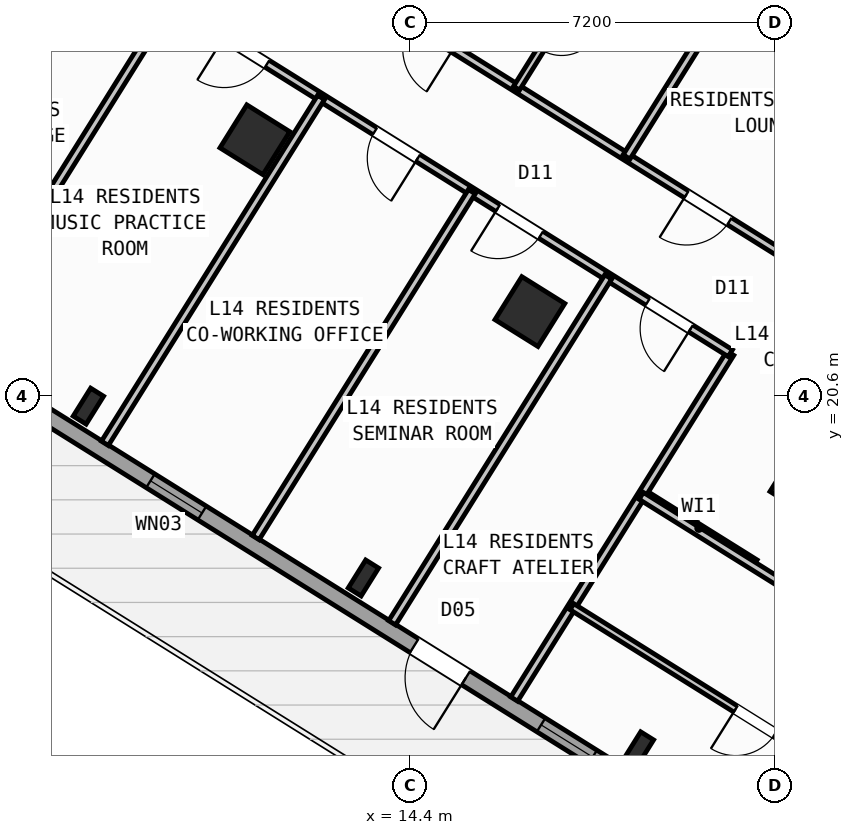
"""IFC4 building model, lengths in metres.
Left out: names, types, materials, properties, quantities, classifications, styles, units other than length and angle.
Written with IfcOpenShell. Run it as: python <this file> out.ifc"""

import sys

from ifc_helpers import new_model, si_unit, direction, frame, frame_2d, origin, origin_2d, place, context, subcontext, project, spatial, rectangle, hollow_rectangle, i_section, extrude, source, transform, mapped, element, fill, save


model = new_model("IFC4")
c1 = context("Model", 3, precision=1e-05, world=origin(), true_north=direction((0.0, 1.0)))
c2 = subcontext(c1, "Body", "Model", "MODEL_VIEW")
j1 = project(units=[si_unit("LENGTHUNIT", "METRE"), si_unit("PLANEANGLEUNIT", "RADIAN")], contexts=[c1])
p1 = place(None, origin())
s1 = spatial("IfcSite", under=j1, at=p1, CompositionType="ELEMENT")
p2 = place(p1, origin())
s2 = spatial("IfcBuilding", under=s1, at=p2, CompositionType="ELEMENT")
p3 = place(p2, frame((0.0, 0.0, 56.4)))
s3 = spatial("IfcBuildingStorey", under=s2, at=p3, CompositionType="ELEMENT", Elevation=56.4)
m1 = source(origin(), c2, "Body", "SweptSolid", [
    extrude(hollow_rectangle(XDim=1.0, YDim=1.0, WallThickness=0.04, at=origin_2d()), origin(), (0.0, 0.0, 1.0), 3.6),
])
p4 = place(p3, frame((22.191, 18.87, 0.0), z_axis=(0.0, 0.0, 1.0), x_axis=(-0.848048096156, 0.529919264233, 0.0)))
e1 = element("IfcColumn", 1, at=p4, inside=s3, PredefinedType="COLUMN", context=c2, shape_type="MappedRepresentation", body=[
    mapped(m1, transform((0.0, 0.0, 0.0), scale=1.0)),
])
m2 = source(origin(), c2, "Body", "SweptSolid", [
    extrude(i_section(OverallWidth=0.3, OverallDepth=0.65, WebThickness=0.016, FlangeThickness=0.031, at=origin_2d()), origin(), (0.0, 0.0, 1.0), 3.6),
])
p5 = place(p3, frame((18.906, 13.612, 0.0), z_axis=(0.0, 0.0, 1.0), x_axis=(-0.848048096156, 0.529919264233, 0.0)))
e2 = element("IfcColumn", 2, at=p5, inside=s3, PredefinedType="COLUMN", context=c2, shape_type="MappedRepresentation", body=[
    mapped(m2, transform((0.0, 0.0, 0.0), scale=1.0)),
])
p6 = place(p3, frame((16.764, 22.261, 0.0), z_axis=(0.0, 0.0, 1.0), x_axis=(-0.848048096156, 0.529919264233, 0.0)))
e3 = element("IfcColumn", 3, at=p6, inside=s3, PredefinedType="COLUMN", context=c2, shape_type="MappedRepresentation", body=[
    mapped(m1, transform((0.0, 0.0, 0.0), scale=1.0)),
])
p7 = place(p3, frame((13.478, 17.003, 0.0), z_axis=(0.0, 0.0, 1.0), x_axis=(-0.848048096156, 0.529919264233, 0.0)))
e4 = element("IfcColumn", 4, at=p7, inside=s3, PredefinedType="COLUMN", context=c2, shape_type="MappedRepresentation", body=[
    mapped(m2, transform((0.0, 0.0, 0.0), scale=1.0)),
])
p8 = place(p3, frame((11.336, 25.653, 0.0), z_axis=(0.0, 0.0, 1.0), x_axis=(-0.848048096156, 0.529919264233, 0.0)))
e5 = element("IfcColumn", 5, at=p8, inside=s3, PredefinedType="COLUMN", context=c2, shape_type="MappedRepresentation", body=[
    mapped(m1, transform((0.0, 0.0, 0.0), scale=1.0)),
])
p9 = place(p3, frame((8.051, 20.395, 0.0), z_axis=(0.0, 0.0, 1.0), x_axis=(-0.848048096156, 0.529919264233, 0.0)))
e6 = element("IfcColumn", 6, at=p9, inside=s3, PredefinedType="COLUMN", context=c2, shape_type="MappedRepresentation", body=[
    mapped(m2, transform((0.0, 0.0, 0.0), scale=1.0)),
])
p10 = place(p3, frame((29.268, 6.429, 0.0), z_axis=(0.0, 0.0, 1.0), x_axis=(-0.848049971435, 0.529916263149, 0.0)))
e7 = element("IfcWall", 7, at=p10, inside=s3, PredefinedType="STANDARD", context=c2, shape_type="SweptSolid", body=[
    extrude(rectangle(XDim=31.588, YDim=0.32, at=frame_2d((15.794, 0.0))), origin(), (0.0, 0.0, 1.0), 3.35),
])
p11 = place(p10, frame((16.235, 0.0, 0.0)))
e8 = element("IfcOpeningElement", 8, at=p11, cuts=e7, PredefinedType="OPENING", context=c2, shape_type="SweptSolid", body=[
    extrude(rectangle(XDim=1.2, YDim=2.15, at=frame_2d((0.6, 1.075))), frame((0.0, 0.17, 0.0), z_axis=(0.0, -1.0, 0.0), x_axis=(1.0, 0.0, 0.0)), (0.0, 0.0, 1.0), 0.34),
])
p12 = place(p10, frame((2.989, 0.0, 0.8)))
e9 = element("IfcOpeningElement", 9, at=p12, cuts=e7, PredefinedType="OPENING", context=c2, shape_type="SweptSolid", body=[
    extrude(rectangle(XDim=2.1, YDim=1.55, at=frame_2d((1.05, 0.775))), frame((0.0, 0.17, 0.0), z_axis=(0.0, -1.0, 0.0), x_axis=(1.0, 0.0, 0.0)), (0.0, 0.0, 1.0), 0.34),
])
p13 = place(p10, frame((8.359, 0.0, 0.8)))
e10 = element("IfcOpeningElement", 10, at=p13, cuts=e7, PredefinedType="OPENING", context=c2, shape_type="SweptSolid", body=[
    extrude(rectangle(XDim=2.1, YDim=1.55, at=frame_2d((1.05, 0.775))), frame((0.0, 0.17, 0.0), z_axis=(0.0, -1.0, 0.0), x_axis=(1.0, 0.0, 0.0)), (0.0, 0.0, 1.0), 0.34),
])
p14 = place(p10, frame((13.284, 0.0, 0.95)))
e11 = element("IfcOpeningElement", 11, at=p14, cuts=e7, PredefinedType="OPENING", context=c2, shape_type="SweptSolid", body=[
    extrude(rectangle(XDim=1.2, YDim=1.4, at=frame_2d((0.6, 0.7))), frame((0.0, 0.17, 0.0), z_axis=(0.0, -1.0, 0.0), x_axis=(1.0, 0.0, 0.0)), (0.0, 0.0, 1.0), 0.34),
])
p15 = place(p10, frame((22.374, 0.0, 0.95)))
e12 = element("IfcOpeningElement", 12, at=p15, cuts=e7, PredefinedType="OPENING", context=c2, shape_type="SweptSolid", body=[
    extrude(rectangle(XDim=1.2, YDim=1.4, at=frame_2d((0.6, 0.7))), frame((0.0, 0.17, 0.0), z_axis=(0.0, -1.0, 0.0), x_axis=(1.0, 0.0, 0.0)), (0.0, 0.0, 1.0), 0.34),
])
p16 = place(p10, frame((26.351, 0.0, 1.0)))
e13 = element("IfcOpeningElement", 13, at=p16, cuts=e7, PredefinedType="OPENING", context=c2, shape_type="SweptSolid", body=[
    extrude(rectangle(XDim=0.9, YDim=1.25, at=frame_2d((0.45, 0.625))), frame((0.0, 0.17, 0.0), z_axis=(0.0, -1.0, 0.0), x_axis=(1.0, 0.0, 0.0)), (0.0, 0.0, 1.0), 0.34),
])
p17 = place(p10, frame((29.052, 0.0, 0.85)))
e14 = element("IfcOpeningElement", 14, at=p17, cuts=e7, PredefinedType="OPENING", context=c2, shape_type="SweptSolid", body=[
    extrude(rectangle(XDim=1.8, YDim=1.5, at=frame_2d((0.9, 0.75))), frame((0.0, 0.17, 0.0), z_axis=(0.0, -1.0, 0.0), x_axis=(1.0, 0.0, 0.0)), (0.0, 0.0, 1.0), 0.34),
])
p18 = place(p3, frame((2.415, 23.452, 0.0), z_axis=(0.0, 0.0, 1.0), x_axis=(0.52991049553, 0.848053575387, 0.0)))
e15 = element("IfcWall", 15, at=p18, inside=s3, PredefinedType="STANDARD", context=c2, shape_type="SweptSolid", body=[
    extrude(rectangle(XDim=21.587, YDim=0.32, at=frame_2d((10.794, 0.0))), origin(), (0.0, 0.0, 1.0), 2.725),
])
p19 = place(p18, frame((2.356, 0.0, 0.8)))
e16 = element("IfcOpeningElement", 16, at=p19, cuts=e15, PredefinedType="OPENING", context=c2, shape_type="SweptSolid", body=[
    extrude(rectangle(XDim=2.1, YDim=1.55, at=frame_2d((1.05, 0.775))), frame((0.0, 0.17, 0.0), z_axis=(0.0, -1.0, 0.0), x_axis=(1.0, 0.0, 0.0)), (0.0, 0.0, 1.0), 0.34),
])
p20 = place(p18, frame((10.949, 0.0, 1.0)))
e17 = element("IfcOpeningElement", 17, at=p20, cuts=e15, PredefinedType="OPENING", context=c2, shape_type="SweptSolid", body=[
    extrude(rectangle(XDim=0.9, YDim=1.25, at=frame_2d((0.45, 0.625))), frame((0.0, 0.17, 0.0), z_axis=(0.0, -1.0, 0.0), x_axis=(1.0, 0.0, 0.0)), (0.0, 0.0, 1.0), 0.34),
])
p21 = place(p18, frame((15.394, 0.0, 0.85)))
e18 = element("IfcOpeningElement", 18, at=p21, cuts=e15, PredefinedType="OPENING", context=c2, shape_type="SweptSolid", body=[
    extrude(rectangle(XDim=1.5, YDim=1.5, at=frame_2d((0.75, 0.75))), frame((0.0, 0.17, 0.0), z_axis=(0.0, -1.0, 0.0), x_axis=(1.0, 0.0, 0.0)), (0.0, 0.0, 1.0), 0.34),
])
p22 = place(p18, frame((18.194, 0.0, 0.85)))
e19 = element("IfcOpeningElement", 19, at=p22, cuts=e15, PredefinedType="OPENING", context=c2, shape_type="SweptSolid", body=[
    extrude(rectangle(XDim=1.5, YDim=1.5, at=frame_2d((0.75, 0.75))), frame((0.0, 0.17, 0.0), z_axis=(0.0, -1.0, 0.0), x_axis=(1.0, 0.0, 0.0)), (0.0, 0.0, 1.0), 0.34),
])
p23 = place(p3, frame((14.138, 41.825, 0.0), z_axis=(0.0, 0.0, 1.0), x_axis=(0.848046498049, -0.529921821731, 0.0)))
e20 = element("IfcWall", 20, at=p23, inside=s3, PredefinedType="STANDARD", context=c2, shape_type="SweptSolid", body=[
    extrude(rectangle(XDim=31.588, YDim=0.32, at=frame_2d((15.794, 0.0))), origin(), (0.0, 0.0, 1.0), 3.35),
])
p24 = place(p23, frame((9.772, 0.0, 0.0)))
e21 = element("IfcOpeningElement", 21, at=p24, cuts=e20, PredefinedType="OPENING", context=c2, shape_type="SweptSolid", body=[
    extrude(rectangle(XDim=1.05, YDim=2.15, at=frame_2d((0.525, 1.075))), frame((0.0, 0.17, 0.0), z_axis=(0.0, -1.0, 0.0), x_axis=(1.0, 0.0, 0.0)), (0.0, 0.0, 1.0), 0.34),
])
p25 = place(p23, frame((0.966, 0.0, 0.85)))
e22 = element("IfcOpeningElement", 22, at=p25, cuts=e20, PredefinedType="OPENING", context=c2, shape_type="SweptSolid", body=[
    extrude(rectangle(XDim=1.5, YDim=1.5, at=frame_2d((0.75, 0.75))), frame((0.0, 0.17, 0.0), z_axis=(0.0, -1.0, 0.0), x_axis=(1.0, 0.0, 0.0)), (0.0, 0.0, 1.0), 0.34),
])
p26 = place(p23, frame((4.121, 0.0, 1.0)))
e23 = element("IfcOpeningElement", 23, at=p26, cuts=e20, PredefinedType="OPENING", context=c2, shape_type="SweptSolid", body=[
    extrude(rectangle(XDim=0.9, YDim=1.25, at=frame_2d((0.45, 0.625))), frame((0.0, 0.17, 0.0), z_axis=(0.0, -1.0, 0.0), x_axis=(1.0, 0.0, 0.0)), (0.0, 0.0, 1.0), 0.34),
])
p27 = place(p23, frame((13.899, 0.0, 0.85)))
e24 = element("IfcOpeningElement", 24, at=p27, cuts=e20, PredefinedType="OPENING", context=c2, shape_type="SweptSolid", body=[
    extrude(rectangle(XDim=1.5, YDim=1.5, at=frame_2d((0.75, 0.75))), frame((0.0, 0.17, 0.0), z_axis=(0.0, -1.0, 0.0), x_axis=(1.0, 0.0, 0.0)), (0.0, 0.0, 1.0), 0.34),
])
p28 = place(p23, frame((22.019, 0.0, 0.95)))
e25 = element("IfcOpeningElement", 25, at=p28, cuts=e20, PredefinedType="OPENING", context=c2, shape_type="SweptSolid", body=[
    extrude(rectangle(XDim=1.2, YDim=1.4, at=frame_2d((0.6, 0.7))), frame((0.0, 0.17, 0.0), z_axis=(0.0, -1.0, 0.0), x_axis=(1.0, 0.0, 0.0)), (0.0, 0.0, 1.0), 0.34),
])
p29 = place(p23, frame((27.569, 0.0, 0.95)))
e26 = element("IfcOpeningElement", 26, at=p29, cuts=e20, PredefinedType="OPENING", context=c2, shape_type="SweptSolid", body=[
    extrude(rectangle(XDim=1.2, YDim=1.4, at=frame_2d((0.6, 0.7))), frame((0.0, 0.17, 0.0), z_axis=(0.0, -1.0, 0.0), x_axis=(1.0, 0.0, 0.0)), (0.0, 0.0, 1.0), 0.34),
])
p30 = place(p3, frame((21.206, 17.292, 0.0), z_axis=(0.0, 0.0, 1.0), x_axis=(-0.848050851465, 0.529914854792, 0.0)))
e27 = element("IfcWall", 27, at=p30, inside=s3, PredefinedType="PARTITIONING", context=c2, shape_type="SweptSolid", body=[
    extrude(rectangle(XDim=2.61, YDim=0.16, at=frame_2d((1.305, 0.0))), origin(), (0.0, 0.0, 1.0), 3.34),
])
p31 = place(p3, frame((20.719, 21.44, 0.0), z_axis=(0.0, 0.0, 1.0), x_axis=(-0.529906246318, -0.848056230514, 0.0)))
e28 = element("IfcWall", 28, at=p31, inside=s3, PredefinedType="PARTITIONING", context=c2, shape_type="SweptSolid", body=[
    extrude(rectangle(XDim=8.05, YDim=0.16, at=frame_2d((4.025, 0.0))), origin(), (0.0, 0.0, 1.0), 3.34),
])
p32 = place(p3, frame((21.885, 23.306, 0.0), z_axis=(0.0, 0.0, 1.0), x_axis=(-0.848052408131, 0.529912363569, 0.0)))
e29 = element("IfcWall", 29, at=p32, inside=s3, PredefinedType="PARTITIONING", context=c2, shape_type="SweptSolid", body=[
    extrude(rectangle(XDim=16.73, YDim=0.16, at=frame_2d((8.365, 0.0))), origin(), (0.0, 0.0, 1.0), 3.34),
])
p33 = place(p32, frame((1.395, 0.0, 0.0)))
e30 = element("IfcOpeningElement", 30, at=p33, cuts=e29, PredefinedType="OPENING", context=c2, shape_type="SweptSolid", body=[
    extrude(rectangle(XDim=1.0, YDim=2.1, at=frame_2d((0.5, 1.05))), frame((0.0, 0.09, 0.0), z_axis=(0.0, -1.0, 0.0), x_axis=(1.0, 0.0, 0.0)), (0.0, 0.0, 1.0), 0.18),
])
p34 = place(p32, frame((7.82, 0.0, 0.0)))
e31 = element("IfcOpeningElement", 31, at=p34, cuts=e29, PredefinedType="OPENING", context=c2, shape_type="SweptSolid", body=[
    extrude(rectangle(XDim=1.0, YDim=2.1, at=frame_2d((0.5, 1.05))), frame((0.0, 0.09, 0.0), z_axis=(0.0, -1.0, 0.0), x_axis=(1.0, 0.0, 0.0)), (0.0, 0.0, 1.0), 0.18),
])
p35 = place(p32, frame((11.14, 0.0, 0.0)))
e32 = element("IfcOpeningElement", 32, at=p35, cuts=e29, PredefinedType="OPENING", context=c2, shape_type="SweptSolid", body=[
    extrude(rectangle(XDim=1.0, YDim=2.1, at=frame_2d((0.5, 1.05))), frame((0.0, 0.09, 0.0), z_axis=(0.0, -1.0, 0.0), x_axis=(1.0, 0.0, 0.0)), (0.0, 0.0, 1.0), 0.18),
])
p36 = place(p3, frame((20.719, 21.44, 0.0), z_axis=(0.0, 0.0, 1.0), x_axis=(-0.848048310262, 0.529918921593, 0.0)))
e33 = element("IfcWall", 33, at=p36, inside=s3, PredefinedType="PARTITIONING", context=c2, shape_type="SweptSolid", body=[
    extrude(rectangle(XDim=16.73, YDim=0.16, at=frame_2d((8.365, 0.0))), origin(), (0.0, 0.0, 1.0), 3.34),
])
p37 = place(p36, frame((0.92, 0.0, 0.0)))
e34 = element("IfcOpeningElement", 34, at=p37, cuts=e33, PredefinedType="OPENING", context=c2, shape_type="SweptSolid", body=[
    extrude(rectangle(XDim=1.0, YDim=2.1, at=frame_2d((0.5, 1.05))), frame((0.0, 0.09, 0.0), z_axis=(0.0, -1.0, 0.0), x_axis=(1.0, 0.0, 0.0)), (0.0, 0.0, 1.0), 0.18),
])
p38 = place(p36, frame((4.408, 0.0, 0.0)))
e35 = element("IfcOpeningElement", 35, at=p38, cuts=e33, PredefinedType="OPENING", context=c2, shape_type="SweptSolid", body=[
    extrude(rectangle(XDim=1.0, YDim=2.1, at=frame_2d((0.5, 1.05))), frame((0.0, 0.09, 0.0), z_axis=(0.0, -1.0, 0.0), x_axis=(1.0, 0.0, 0.0)), (0.0, 0.0, 1.0), 0.18),
])
p39 = place(p36, frame((7.271, 0.0, 0.0)))
e36 = element("IfcOpeningElement", 36, at=p39, cuts=e33, PredefinedType="OPENING", context=c2, shape_type="SweptSolid", body=[
    extrude(rectangle(XDim=1.0, YDim=2.1, at=frame_2d((0.5, 1.05))), frame((0.0, 0.09, 0.0), z_axis=(0.0, -1.0, 0.0), x_axis=(1.0, 0.0, 0.0)), (0.0, 0.0, 1.0), 0.18),
])
p40 = place(p36, frame((10.78, 0.0, 0.0)))
e37 = element("IfcOpeningElement", 37, at=p40, cuts=e33, PredefinedType="OPENING", context=c2, shape_type="SweptSolid", body=[
    extrude(rectangle(XDim=1.0, YDim=2.1, at=frame_2d((0.5, 1.05))), frame((0.0, 0.09, 0.0), z_axis=(0.0, -1.0, 0.0), x_axis=(1.0, 0.0, 0.0)), (0.0, 0.0, 1.0), 0.18),
])
p41 = place(p36, frame((14.372, 0.0, 0.0)))
e38 = element("IfcOpeningElement", 38, at=p41, cuts=e33, PredefinedType="OPENING", context=c2, shape_type="SweptSolid", body=[
    extrude(rectangle(XDim=1.0, YDim=2.1, at=frame_2d((0.5, 1.05))), frame((0.0, 0.09, 0.0), z_axis=(0.0, -1.0, 0.0), x_axis=(1.0, 0.0, 0.0)), (0.0, 0.0, 1.0), 0.18),
])
p42 = place(p3, frame((18.31, 22.946, 0.0), z_axis=(0.0, 0.0, 1.0), x_axis=(-0.529914428959, -0.848051117552, 0.0)))
e39 = element("IfcWall", 39, at=p42, inside=s3, PredefinedType="PARTITIONING", context=c2, shape_type="SweptSolid", body=[
    extrude(rectangle(XDim=8.05, YDim=0.16, at=frame_2d((4.025, 0.0))), origin(), (0.0, 0.0, 1.0), 3.34),
])
p43 = place(p3, frame((15.618, 24.628, 0.0), z_axis=(0.0, 0.0, 1.0), x_axis=(-0.529928058306, -0.848042600947, 0.0)))
e40 = element("IfcWall", 40, at=p43, inside=s3, PredefinedType="PARTITIONING", context=c2, shape_type="SweptSolid", body=[
    extrude(rectangle(XDim=8.05, YDim=0.16, at=frame_2d((4.025, 0.0))), origin(), (0.0, 0.0, 1.0), 2.995),
])
p44 = place(p3, frame((12.642, 26.488, 0.0), z_axis=(0.0, 0.0, 1.0), x_axis=(-0.529914428959, -0.848051117552, 0.0)))
e41 = element("IfcWall", 41, at=p44, inside=s3, PredefinedType="PARTITIONING", context=c2, shape_type="SweptSolid", body=[
    extrude(rectangle(XDim=8.05, YDim=0.16, at=frame_2d((4.025, 0.0))), origin(), (0.0, 0.0, 1.0), 3.34),
])
p45 = place(p3, frame((9.666, 28.347, 0.0), z_axis=(0.0, 0.0, 1.0), x_axis=(-0.529928058306, -0.848042600947, 0.0)))
e42 = element("IfcWall", 42, at=p45, inside=s3, PredefinedType="PARTITIONING", context=c2, shape_type="SweptSolid", body=[
    extrude(rectangle(XDim=8.05, YDim=0.16, at=frame_2d((4.025, 0.0))), origin(), (0.0, 0.0, 1.0), 3.34),
])
p46 = place(p3, frame((20.361, 28.018, 0.0), z_axis=(0.0, 0.0, 1.0), x_axis=(-0.529875025416, -0.848075738033, 0.0)))
e43 = element("IfcWall", 43, at=p46, inside=s3, PredefinedType="PARTITIONING", context=c2, shape_type="SweptSolid", body=[
    extrude(rectangle(XDim=3.188, YDim=0.16, at=frame_2d((1.594, 0.0))), origin(), (0.0, 0.0, 1.0), 2.725),
])
p47 = place(p3, frame((17.867, 28.859, 0.0), z_axis=(0.0, 0.0, 1.0), x_axis=(-0.529913878929, -0.848051461244, 0.0)))
e44 = element("IfcWall", 44, at=p47, inside=s3, PredefinedType="PLUMBINGWALL", context=c2, shape_type="SweptSolid", body=[
    extrude(rectangle(XDim=2.58, YDim=0.14, at=frame_2d((1.29, 0.0))), origin(), (0.0, 0.0, 1.0), 3.34),
])
p48 = place(p47, frame((0.9, 0.0, 0.0)))
e45 = element("IfcOpeningElement", 45, at=p48, cuts=e44, PredefinedType="OPENING", context=c2, shape_type="SweptSolid", body=[
    extrude(rectangle(XDim=0.78, YDim=2.05, at=frame_2d((0.39, 1.025))), frame((0.0, 0.08, 0.0), z_axis=(0.0, -1.0, 0.0), x_axis=(1.0, 0.0, 0.0)), (0.0, 0.0, 1.0), 0.16),
])
p49 = place(p3, frame((32.164, 10.374, 0.0), z_axis=(0.0, 0.0, 1.0), x_axis=(-0.848044107957, 0.529925646633, 0.0)))
e46 = element("IfcWall", 46, at=p49, inside=s3, PredefinedType="PARTITIONING", context=c2, shape_type="SweptSolid", body=[
    extrude(rectangle(XDim=15.57, YDim=0.16, at=frame_2d((7.785, 0.0))), origin(), (0.0, 0.0, 1.0), 3.34),
])
p50 = place(p49, frame((10.83, 0.0, 0.0)))
e47 = element("IfcOpeningElement", 47, at=p50, cuts=e46, PredefinedType="OPENING", context=c2, shape_type="SweptSolid", body=[
    extrude(rectangle(XDim=1.0, YDim=2.1, at=frame_2d((0.5, 1.05))), frame((0.0, 0.09, 0.0), z_axis=(0.0, -1.0, 0.0), x_axis=(1.0, 0.0, 0.0)), (0.0, 0.0, 1.0), 0.18),
])
p51 = place(p3, frame((29.72, 8.859, 0.0), z_axis=(0.0, 0.0, 1.0), x_axis=(-0.848049134363, 0.529917602752, 0.0)))
e48 = element("IfcWall", 48, at=p51, inside=s3, PredefinedType="PLUMBINGWALL", context=c2, shape_type="SweptSolid", body=[
    extrude(rectangle(XDim=14.3, YDim=0.14, at=frame_2d((7.15, 0.0))), origin(), (0.0, 0.0, 1.0), 3.34),
])
p52 = place(p51, frame((9.57, 0.0, 0.0)))
e49 = element("IfcOpeningElement", 49, at=p52, cuts=e48, PredefinedType="OPENING", context=c2, shape_type="SweptSolid", body=[
    extrude(rectangle(XDim=0.92, YDim=2.08, at=frame_2d((0.46, 1.04))), frame((0.0, 0.08, 0.0), z_axis=(0.0, -1.0, 0.0), x_axis=(1.0, 0.0, 0.0)), (0.0, 0.0, 1.0), 0.16),
])
m3 = source(origin(), c2, "Body", "SweptSolid", [
    extrude(rectangle(XDim=1.2, YDim=2.15, at=frame_2d((0.6, 1.075))), frame((0.0, 0.025, 0.0), z_axis=(0.0, -1.0, 0.0), x_axis=(1.0, 0.0, 0.0)), (0.0, 0.0, 1.0), 0.05),
])
p53 = place(p11, origin())
e50 = element("IfcDoor", 50, at=p53, inside=s3, OperationType="SINGLE_SWING_LEFT", PredefinedType="DOOR", context=c2, shape_type="MappedRepresentation", body=[
    mapped(m3, transform((0.0, 0.0, 0.0), scale=1.0)),
])
fill(e8, e50)
m4 = source(origin(), c2, "Body", "SweptSolid", [
    extrude(rectangle(XDim=1.2, YDim=1.4, at=frame_2d((0.6, 0.7))), frame((0.0, 0.03, 0.0), z_axis=(0.0, -1.0, 0.0), x_axis=(1.0, 0.0, 0.0)), (0.0, 0.0, 1.0), 0.06),
])
p54 = place(p14, origin())
e51 = element("IfcWindow", 51, at=p54, inside=s3, PartitioningType="SINGLE_PANEL", PredefinedType="WINDOW", context=c2, shape_type="MappedRepresentation", body=[
    mapped(m4, transform((0.0, 0.0, 0.0), scale=1.0)),
])
fill(e11, e51)
p55 = place(p15, origin())
e52 = element("IfcWindow", 52, at=p55, inside=s3, PartitioningType="SINGLE_PANEL", PredefinedType="WINDOW", context=c2, shape_type="MappedRepresentation", body=[
    mapped(m4, transform((0.0, 0.0, 0.0), scale=1.0)),
])
fill(e12, e52)
m5 = source(origin(), c2, "Body", "SweptSolid", [
    extrude(rectangle(XDim=1.0, YDim=2.1, at=frame_2d((0.5, 1.05))), frame((0.0, 0.025, 0.0), z_axis=(0.0, -1.0, 0.0), x_axis=(1.0, 0.0, 0.0)), (0.0, 0.0, 1.0), 0.05),
])
p56 = place(p37, origin())
e53 = element("IfcDoor", 53, at=p56, inside=s3, OperationType="SINGLE_SWING_LEFT", PredefinedType="DOOR", context=c2, shape_type="MappedRepresentation", body=[
    mapped(m5, transform((0.0, 0.0, 0.0), scale=1.0)),
])
fill(e34, e53)
p57 = place(p38, origin())
e54 = element("IfcDoor", 54, at=p57, inside=s3, OperationType="SINGLE_SWING_RIGHT", PredefinedType="DOOR", context=c2, shape_type="MappedRepresentation", body=[
    mapped(m5, transform((0.0, 0.0, 0.0), scale=1.0)),
])
fill(e35, e54)
p58 = place(p39, origin())
e55 = element("IfcDoor", 55, at=p58, inside=s3, OperationType="SINGLE_SWING_LEFT", PredefinedType="DOOR", context=c2, shape_type="MappedRepresentation", body=[
    mapped(m5, transform((0.0, 0.0, 0.0), scale=1.0)),
])
fill(e36, e55)
p59 = place(p40, origin())
e56 = element("IfcDoor", 56, at=p59, inside=s3, OperationType="SINGLE_SWING_RIGHT", PredefinedType="DOOR", context=c2, shape_type="MappedRepresentation", body=[
    mapped(m5, transform((0.0, 0.0, 0.0), scale=1.0)),
])
fill(e37, e56)
p60 = place(p33, origin())
e57 = element("IfcDoor", 57, at=p60, inside=s3, OperationType="SINGLE_SWING_RIGHT", PredefinedType="DOOR", context=c2, shape_type="MappedRepresentation", body=[
    mapped(m5, transform((0.0, 0.0, 0.0), scale=1.0)),
])
fill(e30, e57)
m6 = source(origin(), c2, "Body", "SweptSolid", [
    extrude(rectangle(XDim=0.92, YDim=2.08, at=frame_2d((0.46, 1.04))), frame((0.0, 0.025, 0.0), z_axis=(0.0, -1.0, 0.0), x_axis=(1.0, 0.0, 0.0)), (0.0, 0.0, 1.0), 0.05),
])
p61 = place(p52, origin())
e58 = element("IfcDoor", 58, at=p61, inside=s3, OperationType="SINGLE_SWING_RIGHT", PredefinedType="DOOR", context=c2, shape_type="MappedRepresentation", body=[
    mapped(m6, transform((0.0, 0.0, 0.0), scale=1.0)),
])
fill(e49, e58)
save(model, sys.argv[1])
